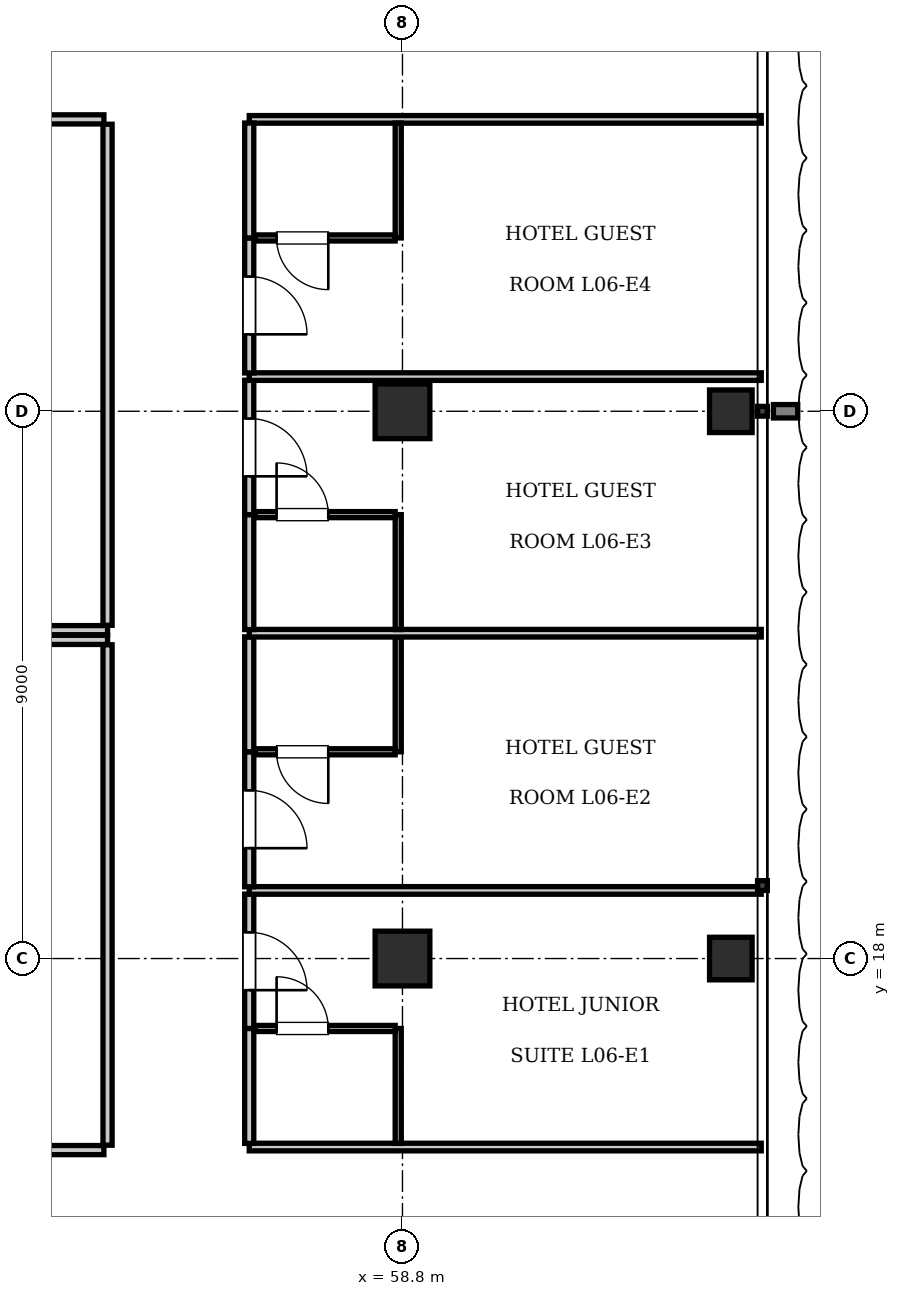
"""IFC4 building model, lengths in metres.
Left out: names, types, materials, properties, quantities, classifications, styles, units other than length and angle.
Written with IfcOpenShell. Run it as: python <this file> out.ifc"""

import sys

from ifc_helpers import new_model, si_unit, direction, frame, frame_2d, origin, origin_2d, place, context, subcontext, project, spatial, rectangle, i_section, extrude, element, fill, save


model = new_model("IFC4")
c1 = context("Model", 3, precision=1e-05, world=origin(), true_north=direction((0.0, 1.0)))
c2 = subcontext(c1, "Body", "Model", "MODEL_VIEW")
j1 = project(units=[si_unit("LENGTHUNIT", "METRE"), si_unit("PLANEANGLEUNIT", "RADIAN")], contexts=[c1])
p1 = place(None, origin())
s1 = spatial("IfcSite", under=j1, at=p1, CompositionType="ELEMENT")
p2 = place(p1, origin())
s2 = spatial("IfcBuilding", under=s1, at=p2, CompositionType="ELEMENT")
p3 = place(p2, frame((0.0, 0.0, 30.8)))
s3 = spatial("IfcBuildingStorey", under=s2, at=p3, CompositionType="ELEMENT", Elevation=30.8)
for number, where, z_axis, x_axis in (
    (1, (58.8, 18.0, 0.0), (0.0, 0.0, 1.0), (1.0, 0.0, 0.0)),
    (2, (58.8, 27.0, 0.0), (0.0, 0.0, 1.0), (1.0, 0.0, 0.0)),
):
    element("IfcColumn", number, at=place(p3, frame(where, z_axis=z_axis, x_axis=x_axis)), inside=s3, PredefinedType="COLUMN", context=c2, shape_type="SweptSolid", body=[
        extrude(rectangle(XDim=0.9, YDim=0.9, at=origin_2d()), origin(), (0.0, 0.0, 1.0), 3.85),
    ])
for number, where, z_axis, x_axis in (
    (3, (64.2, 18.0, 0.0), (0.0, 0.0, 1.0), (1.0, 0.0, 0.0)),
    (4, (64.2, 27.0, 0.0), (0.0, 0.0, 1.0), (1.0, 0.0, 0.0)),
):
    element("IfcColumn", number, at=place(p3, frame(where, z_axis=z_axis, x_axis=x_axis)), inside=s3, PredefinedType="COLUMN", context=c2, shape_type="SweptSolid", body=[
        extrude(i_section(OverallWidth=0.7, OverallDepth=0.7, WebThickness=0.028, FlangeThickness=0.044, at=origin_2d()), origin(), (0.0, 0.0, 1.0), 3.85),
    ])
p4 = place(p3, frame((21.65, 23.4, 0.0), z_axis=(0.0, 0.0, 1.0), x_axis=(1.0, 0.0, 0.0)))
e5 = element("IfcWall", 5, at=p4, inside=s3, PredefinedType="PARTITIONING", context=c2, shape_type="SweptSolid", body=[
    extrude(rectangle(XDim=32.3, YDim=0.15, at=frame_2d((16.15, 0.0))), origin(), (0.0, 0.0, 1.0), 3.61),
])
p5 = place(p3, frame((53.95, 23.48, 0.0), z_axis=(0.0, 0.0, 1.0), x_axis=(0.0, 1.0, 0.0)))
e6 = element("IfcWall", 6, at=p5, inside=s3, PredefinedType="PARTITIONING", context=c2, shape_type="SweptSolid", body=[
    extrude(rectangle(XDim=8.24, YDim=0.15, at=frame_2d((4.12, 0.0))), origin(), (0.0, 0.0, 1.0), 3.61),
])
p6 = place(p3, frame((42.998, 31.8, 0.0), z_axis=(0.0, 0.0, 1.0), x_axis=(1.0, 0.0, 0.0)))
e7 = element("IfcWall", 7, at=p6, inside=s3, PredefinedType="PARTITIONING", context=c2, shape_type="SweptSolid", body=[
    extrude(rectangle(XDim=10.892, YDim=0.15, at=frame_2d((5.446, 0.0))), origin(), (0.0, 0.0, 1.0), 3.61),
])
p7 = place(p6, frame((4.996, 0.0, 0.0)))
e8 = element("IfcOpeningElement", 8, at=p7, cuts=e7, PredefinedType="OPENING", context=c2, shape_type="SweptSolid", body=[
    extrude(rectangle(XDim=0.9, YDim=2.1, at=frame_2d((0.45, 1.05))), frame((0.0, 0.085, 0.0), z_axis=(0.0, -1.0, 0.0), x_axis=(1.0, 0.0, 0.0)), (0.0, 0.0, 1.0), 0.17),
])
p8 = place(p3, frame((21.65, 23.24, 0.0), z_axis=(0.0, 0.0, 1.0), x_axis=(1.0, 0.0, 0.0)))
e9 = element("IfcWall", 9, at=p8, inside=s3, PredefinedType="PARTITIONING", context=c2, shape_type="SweptSolid", body=[
    extrude(rectangle(XDim=32.3, YDim=0.15, at=frame_2d((16.15, 0.0))), origin(), (0.0, 0.0, 1.0), 3.61),
])
p9 = place(p3, frame((53.95, 14.93, 0.0), z_axis=(0.0, 0.0, 1.0), x_axis=(0.0, 1.0, 0.0)))
e10 = element("IfcWall", 10, at=p9, inside=s3, PredefinedType="PARTITIONING", context=c2, shape_type="SweptSolid", body=[
    extrude(rectangle(XDim=8.23, YDim=0.15, at=frame_2d((4.115, 0.0))), origin(), (0.0, 0.0, 1.0), 3.61),
])
p10 = place(p3, frame((33.631, 14.85, 0.0), z_axis=(0.0, 0.0, 1.0), x_axis=(1.0, 0.0, 0.0)))
e11 = element("IfcWall", 11, at=p10, inside=s3, PredefinedType="PARTITIONING", context=c2, shape_type="SweptSolid", body=[
    extrude(rectangle(XDim=20.259, YDim=0.15, at=frame_2d((10.129, 0.0))), origin(), (0.0, 0.0, 1.0), 3.61),
])
p11 = place(p10, frame((9.679, 0.0, 0.0)))
e12 = element("IfcOpeningElement", 12, at=p11, cuts=e11, PredefinedType="OPENING", context=c2, shape_type="SweptSolid", body=[
    extrude(rectangle(XDim=0.9, YDim=2.1, at=frame_2d((0.45, 1.05))), frame((0.0, 0.085, 0.0), z_axis=(0.0, -1.0, 0.0), x_axis=(1.0, 0.0, 0.0)), (0.0, 0.0, 1.0), 0.17),
])
for number, where, z_axis, x_axis in (
    (13, (56.28, 14.9, 0.0), (0.0, 0.0, 1.0), (1.0, 0.0, 0.0)),
    (14, (56.28, 31.8, 0.0), (0.0, 0.0, 1.0), (1.0, 0.0, 0.0)),
):
    element("IfcWall", number, at=place(p3, frame(where, z_axis=z_axis, x_axis=x_axis)), inside=s3, PredefinedType="PARTITIONING", context=c2, shape_type="SweptSolid", body=[
        extrude(rectangle(XDim=8.42, YDim=0.125, at=frame_2d((4.21, 0.0))), origin(), (0.0, 0.0, 1.0), 3.61),
    ])
p12 = place(p3, frame((56.28, 14.96, 0.0), z_axis=(0.0, 0.0, 1.0), x_axis=(0.0, 1.0, 0.0)))
e15 = element("IfcWall", 15, at=p12, inside=s3, PredefinedType="PARTITIONING", context=c2, shape_type="SweptSolid", body=[
    extrude(rectangle(XDim=1.89, YDim=0.15, at=frame_2d((0.945, 0.0))), origin(), (0.0, 0.0, 1.0), 3.61),
])
p13 = place(p3, frame((56.28, 16.85, 0.0), z_axis=(0.0, 0.0, 1.0), x_axis=(0.0, 1.0, 0.0)))
e16 = element("IfcWall", 16, at=p13, inside=s3, PredefinedType="PARTITIONING", context=c2, shape_type="SweptSolid", body=[
    extrude(rectangle(XDim=2.21, YDim=0.15, at=frame_2d((1.105, 0.0))), origin(), (0.0, 0.0, 1.0), 3.61),
])
p14 = place(p13, frame((0.63, 0.0, 0.0)))
e17 = element("IfcOpeningElement", 17, at=p14, cuts=e16, PredefinedType="OPENING", context=c2, shape_type="SweptSolid", body=[
    extrude(rectangle(XDim=0.95, YDim=2.15, at=frame_2d((0.475, 1.075))), frame((0.0, 0.085, 0.0), z_axis=(0.0, -1.0, 0.0), x_axis=(1.0, 0.0, 0.0)), (0.0, 0.0, 1.0), 0.17),
])
p15 = place(p3, frame((58.73, 14.96, 0.0), z_axis=(0.0, 0.0, 1.0), x_axis=(0.0, 1.0, 0.0)))
e18 = element("IfcWall", 18, at=p15, inside=s3, PredefinedType="PARTITIONING", context=c2, shape_type="SweptSolid", body=[
    extrude(rectangle(XDim=1.89, YDim=0.1, at=frame_2d((0.945, 0.0))), origin(), (0.0, 0.0, 1.0), 2.975),
])
p16 = place(p3, frame((56.38, 16.85, 0.0), z_axis=(0.0, 0.0, 1.0), x_axis=(1.0, 0.0, 0.0)))
e19 = element("IfcWall", 19, at=p16, inside=s3, PredefinedType="PARTITIONING", context=c2, shape_type="SweptSolid", body=[
    extrude(rectangle(XDim=2.3, YDim=0.1, at=frame_2d((1.15, 0.0))), origin(), (0.0, 0.0, 1.0), 3.61),
])
p17 = place(p16, frame((0.35, 0.0, 0.0)))
e20 = element("IfcOpeningElement", 20, at=p17, cuts=e19, PredefinedType="OPENING", context=c2, shape_type="SweptSolid", body=[
    extrude(rectangle(XDim=0.85, YDim=2.1, at=frame_2d((0.425, 1.05))), frame((0.0, 0.06, 0.0), z_axis=(0.0, -1.0, 0.0), x_axis=(1.0, 0.0, 0.0)), (0.0, 0.0, 1.0), 0.12),
])
p18 = place(p3, frame((56.28, 19.12, 0.0), z_axis=(0.0, 0.0, 1.0), x_axis=(1.0, 0.0, 0.0)))
e21 = element("IfcWall", 21, at=p18, inside=s3, PredefinedType="PARTITIONING", context=c2, shape_type="SweptSolid", body=[
    extrude(rectangle(XDim=8.42, YDim=0.125, at=frame_2d((4.21, 0.0))), origin(), (0.0, 0.0, 1.0), 3.61),
])
p19 = place(p3, frame((56.28, 19.18, 0.0), z_axis=(0.0, 0.0, 1.0), x_axis=(0.0, 1.0, 0.0)))
e22 = element("IfcWall", 22, at=p19, inside=s3, PredefinedType="PARTITIONING", context=c2, shape_type="SweptSolid", body=[
    extrude(rectangle(XDim=2.22, YDim=0.15, at=frame_2d((1.11, 0.0))), origin(), (0.0, 0.0, 1.0), 3.61),
])
p20 = place(p19, frame((0.635, 0.0, 0.0)))
e23 = element("IfcOpeningElement", 23, at=p20, cuts=e22, PredefinedType="OPENING", context=c2, shape_type="SweptSolid", body=[
    extrude(rectangle(XDim=0.95, YDim=2.15, at=frame_2d((0.475, 1.075))), frame((0.0, 0.085, 0.0), z_axis=(0.0, -1.0, 0.0), x_axis=(1.0, 0.0, 0.0)), (0.0, 0.0, 1.0), 0.17),
])
p21 = place(p3, frame((56.28, 21.4, 0.0), z_axis=(0.0, 0.0, 1.0), x_axis=(0.0, 1.0, 0.0)))
e24 = element("IfcWall", 24, at=p21, inside=s3, PredefinedType="PARTITIONING", context=c2, shape_type="SweptSolid", body=[
    extrude(rectangle(XDim=1.89, YDim=0.15, at=frame_2d((0.945, 0.0))), origin(), (0.0, 0.0, 1.0), 3.61),
])
p22 = place(p3, frame((58.73, 21.4, 0.0), z_axis=(0.0, 0.0, 1.0), x_axis=(0.0, 1.0, 0.0)))
e25 = element("IfcWall", 25, at=p22, inside=s3, PredefinedType="PARTITIONING", context=c2, shape_type="SweptSolid", body=[
    extrude(rectangle(XDim=1.89, YDim=0.1, at=frame_2d((0.945, 0.0))), origin(), (0.0, 0.0, 1.0), 2.975),
])
p23 = place(p3, frame((56.38, 21.4, 0.0), z_axis=(0.0, 0.0, 1.0), x_axis=(1.0, 0.0, 0.0)))
e26 = element("IfcWall", 26, at=p23, inside=s3, PredefinedType="PARTITIONING", context=c2, shape_type="SweptSolid", body=[
    extrude(rectangle(XDim=2.3, YDim=0.1, at=frame_2d((1.15, 0.0))), origin(), (0.0, 0.0, 1.0), 3.61),
])
p24 = place(p23, frame((0.35, 0.0, 0.0)))
e27 = element("IfcOpeningElement", 27, at=p24, cuts=e26, PredefinedType="OPENING", context=c2, shape_type="SweptSolid", body=[
    extrude(rectangle(XDim=0.85, YDim=2.1, at=frame_2d((0.425, 1.05))), frame((0.0, 0.06, 0.0), z_axis=(0.0, -1.0, 0.0), x_axis=(1.0, 0.0, 0.0)), (0.0, 0.0, 1.0), 0.12),
])
p25 = place(p3, frame((56.28, 23.35, 0.0), z_axis=(0.0, 0.0, 1.0), x_axis=(1.0, 0.0, 0.0)))
e28 = element("IfcWall", 28, at=p25, inside=s3, PredefinedType="PARTITIONING", context=c2, shape_type="SweptSolid", body=[
    extrude(rectangle(XDim=8.42, YDim=0.125, at=frame_2d((4.21, 0.0))), origin(), (0.0, 0.0, 1.0), 3.61),
])
p26 = place(p3, frame((56.28, 23.41, 0.0), z_axis=(0.0, 0.0, 1.0), x_axis=(0.0, 1.0, 0.0)))
e29 = element("IfcWall", 29, at=p26, inside=s3, PredefinedType="PARTITIONING", context=c2, shape_type="SweptSolid", body=[
    extrude(rectangle(XDim=1.89, YDim=0.15, at=frame_2d((0.945, 0.0))), origin(), (0.0, 0.0, 1.0), 3.61),
])
p27 = place(p3, frame((56.28, 25.3, 0.0), z_axis=(0.0, 0.0, 1.0), x_axis=(0.0, 1.0, 0.0)))
e30 = element("IfcWall", 30, at=p27, inside=s3, PredefinedType="PARTITIONING", context=c2, shape_type="SweptSolid", body=[
    extrude(rectangle(XDim=2.21, YDim=0.15, at=frame_2d((1.105, 0.0))), origin(), (0.0, 0.0, 1.0), 3.61),
])
p28 = place(p27, frame((0.63, 0.0, 0.0)))
e31 = element("IfcOpeningElement", 31, at=p28, cuts=e30, PredefinedType="OPENING", context=c2, shape_type="SweptSolid", body=[
    extrude(rectangle(XDim=0.95, YDim=2.15, at=frame_2d((0.475, 1.075))), frame((0.0, 0.085, 0.0), z_axis=(0.0, -1.0, 0.0), x_axis=(1.0, 0.0, 0.0)), (0.0, 0.0, 1.0), 0.17),
])
p29 = place(p3, frame((58.73, 23.41, 0.0), z_axis=(0.0, 0.0, 1.0), x_axis=(0.0, 1.0, 0.0)))
e32 = element("IfcWall", 32, at=p29, inside=s3, PredefinedType="PARTITIONING", context=c2, shape_type="SweptSolid", body=[
    extrude(rectangle(XDim=1.89, YDim=0.1, at=frame_2d((0.945, 0.0))), origin(), (0.0, 0.0, 1.0), 2.975),
])
p30 = place(p3, frame((56.38, 25.3, 0.0), z_axis=(0.0, 0.0, 1.0), x_axis=(1.0, 0.0, 0.0)))
e33 = element("IfcWall", 33, at=p30, inside=s3, PredefinedType="PARTITIONING", context=c2, shape_type="SweptSolid", body=[
    extrude(rectangle(XDim=2.3, YDim=0.1, at=frame_2d((1.15, 0.0))), origin(), (0.0, 0.0, 1.0), 3.61),
])
p31 = place(p30, frame((0.35, 0.0, 0.0)))
e34 = element("IfcOpeningElement", 34, at=p31, cuts=e33, PredefinedType="OPENING", context=c2, shape_type="SweptSolid", body=[
    extrude(rectangle(XDim=0.85, YDim=2.1, at=frame_2d((0.425, 1.05))), frame((0.0, 0.06, 0.0), z_axis=(0.0, -1.0, 0.0), x_axis=(1.0, 0.0, 0.0)), (0.0, 0.0, 1.0), 0.12),
])
p32 = place(p3, frame((56.28, 27.57, 0.0), z_axis=(0.0, 0.0, 1.0), x_axis=(1.0, 0.0, 0.0)))
e35 = element("IfcWall", 35, at=p32, inside=s3, PredefinedType="PARTITIONING", context=c2, shape_type="SweptSolid", body=[
    extrude(rectangle(XDim=8.42, YDim=0.125, at=frame_2d((4.21, 0.0))), origin(), (0.0, 0.0, 1.0), 3.61),
])
p33 = place(p3, frame((56.28, 27.63, 0.0), z_axis=(0.0, 0.0, 1.0), x_axis=(0.0, 1.0, 0.0)))
e36 = element("IfcWall", 36, at=p33, inside=s3, PredefinedType="PARTITIONING", context=c2, shape_type="SweptSolid", body=[
    extrude(rectangle(XDim=2.22, YDim=0.15, at=frame_2d((1.11, 0.0))), origin(), (0.0, 0.0, 1.0), 3.61),
])
p34 = place(p33, frame((0.635, 0.0, 0.0)))
e37 = element("IfcOpeningElement", 37, at=p34, cuts=e36, PredefinedType="OPENING", context=c2, shape_type="SweptSolid", body=[
    extrude(rectangle(XDim=0.95, YDim=2.15, at=frame_2d((0.475, 1.075))), frame((0.0, 0.085, 0.0), z_axis=(0.0, -1.0, 0.0), x_axis=(1.0, 0.0, 0.0)), (0.0, 0.0, 1.0), 0.17),
])
p35 = place(p3, frame((56.28, 29.85, 0.0), z_axis=(0.0, 0.0, 1.0), x_axis=(0.0, 1.0, 0.0)))
e38 = element("IfcWall", 38, at=p35, inside=s3, PredefinedType="PARTITIONING", context=c2, shape_type="SweptSolid", body=[
    extrude(rectangle(XDim=1.89, YDim=0.15, at=frame_2d((0.945, 0.0))), origin(), (0.0, 0.0, 1.0), 3.61),
])
p36 = place(p3, frame((58.73, 29.85, 0.0), z_axis=(0.0, 0.0, 1.0), x_axis=(0.0, 1.0, 0.0)))
e39 = element("IfcWall", 39, at=p36, inside=s3, PredefinedType="PARTITIONING", context=c2, shape_type="SweptSolid", body=[
    extrude(rectangle(XDim=1.89, YDim=0.1, at=frame_2d((0.945, 0.0))), origin(), (0.0, 0.0, 1.0), 2.975),
])
p37 = place(p3, frame((56.38, 29.85, 0.0), z_axis=(0.0, 0.0, 1.0), x_axis=(1.0, 0.0, 0.0)))
e40 = element("IfcWall", 40, at=p37, inside=s3, PredefinedType="PARTITIONING", context=c2, shape_type="SweptSolid", body=[
    extrude(rectangle(XDim=2.3, YDim=0.1, at=frame_2d((1.15, 0.0))), origin(), (0.0, 0.0, 1.0), 3.61),
])
p38 = place(p37, frame((0.35, 0.0, 0.0)))
e41 = element("IfcOpeningElement", 41, at=p38, cuts=e40, PredefinedType="OPENING", context=c2, shape_type="SweptSolid", body=[
    extrude(rectangle(XDim=0.85, YDim=2.1, at=frame_2d((0.425, 1.05))), frame((0.0, 0.06, 0.0), z_axis=(0.0, -1.0, 0.0), x_axis=(1.0, 0.0, 0.0)), (0.0, 0.0, 1.0), 0.12),
])
p39 = place(p17, origin())
e42 = element("IfcDoor", 42, at=p39, inside=s3, OperationType="SINGLE_SWING_LEFT", PredefinedType="DOOR", context=c2, shape_type="SweptSolid", body=[
    extrude(rectangle(XDim=0.85, YDim=2.1, at=frame_2d((0.425, 1.05))), frame((0.0, 0.025, 0.0), z_axis=(0.0, -1.0, 0.0), x_axis=(1.0, 0.0, 0.0)), (0.0, 0.0, 1.0), 0.05),
])
fill(e20, e42)
p40 = place(p14, frame((0.95, 0.0, 0.0), z_axis=(0.0, 0.0, 1.0), x_axis=(-1.0, 0.0, 0.0)))
e43 = element("IfcDoor", 43, at=p40, inside=s3, OperationType="SINGLE_SWING_RIGHT", PredefinedType="DOOR", context=c2, shape_type="SweptSolid", body=[
    extrude(rectangle(XDim=0.95, YDim=2.15, at=frame_2d((0.475, 1.075))), frame((0.0, 0.025, 0.0), z_axis=(0.0, -1.0, 0.0), x_axis=(1.0, 0.0, 0.0)), (0.0, 0.0, 1.0), 0.05),
])
fill(e17, e43)
p41 = place(p24, frame((0.85, 0.0, 0.0), z_axis=(0.0, 0.0, 1.0), x_axis=(-1.0, 0.0, 0.0)))
e44 = element("IfcDoor", 44, at=p41, inside=s3, OperationType="SINGLE_SWING_LEFT", PredefinedType="DOOR", context=c2, shape_type="SweptSolid", body=[
    extrude(rectangle(XDim=0.85, YDim=2.1, at=frame_2d((0.425, 1.05))), frame((0.0, 0.025, 0.0), z_axis=(0.0, -1.0, 0.0), x_axis=(1.0, 0.0, 0.0)), (0.0, 0.0, 1.0), 0.05),
])
fill(e27, e44)
p42 = place(p20, frame((0.95, 0.0, 0.0), z_axis=(0.0, 0.0, 1.0), x_axis=(-1.0, 0.0, 0.0)))
e45 = element("IfcDoor", 45, at=p42, inside=s3, OperationType="SINGLE_SWING_RIGHT", PredefinedType="DOOR", context=c2, shape_type="SweptSolid", body=[
    extrude(rectangle(XDim=0.95, YDim=2.15, at=frame_2d((0.475, 1.075))), frame((0.0, 0.025, 0.0), z_axis=(0.0, -1.0, 0.0), x_axis=(1.0, 0.0, 0.0)), (0.0, 0.0, 1.0), 0.05),
])
fill(e23, e45)
p43 = place(p31, origin())
e46 = element("IfcDoor", 46, at=p43, inside=s3, OperationType="SINGLE_SWING_LEFT", PredefinedType="DOOR", context=c2, shape_type="SweptSolid", body=[
    extrude(rectangle(XDim=0.85, YDim=2.1, at=frame_2d((0.425, 1.05))), frame((0.0, 0.025, 0.0), z_axis=(0.0, -1.0, 0.0), x_axis=(1.0, 0.0, 0.0)), (0.0, 0.0, 1.0), 0.05),
])
fill(e34, e46)
p44 = place(p28, frame((0.95, 0.0, 0.0), z_axis=(0.0, 0.0, 1.0), x_axis=(-1.0, 0.0, 0.0)))
e47 = element("IfcDoor", 47, at=p44, inside=s3, OperationType="SINGLE_SWING_RIGHT", PredefinedType="DOOR", context=c2, shape_type="SweptSolid", body=[
    extrude(rectangle(XDim=0.95, YDim=2.15, at=frame_2d((0.475, 1.075))), frame((0.0, 0.025, 0.0), z_axis=(0.0, -1.0, 0.0), x_axis=(1.0, 0.0, 0.0)), (0.0, 0.0, 1.0), 0.05),
])
fill(e31, e47)
p45 = place(p38, frame((0.85, 0.0, 0.0), z_axis=(0.0, 0.0, 1.0), x_axis=(-1.0, 0.0, 0.0)))
e48 = element("IfcDoor", 48, at=p45, inside=s3, OperationType="SINGLE_SWING_LEFT", PredefinedType="DOOR", context=c2, shape_type="SweptSolid", body=[
    extrude(rectangle(XDim=0.85, YDim=2.1, at=frame_2d((0.425, 1.05))), frame((0.0, 0.025, 0.0), z_axis=(0.0, -1.0, 0.0), x_axis=(1.0, 0.0, 0.0)), (0.0, 0.0, 1.0), 0.05),
])
fill(e41, e48)
p46 = place(p34, frame((0.95, 0.0, 0.0), z_axis=(0.0, 0.0, 1.0), x_axis=(-1.0, 0.0, 0.0)))
e49 = element("IfcDoor", 49, at=p46, inside=s3, OperationType="SINGLE_SWING_RIGHT", PredefinedType="DOOR", context=c2, shape_type="SweptSolid", body=[
    extrude(rectangle(XDim=0.95, YDim=2.15, at=frame_2d((0.475, 1.075))), frame((0.0, 0.025, 0.0), z_axis=(0.0, -1.0, 0.0), x_axis=(1.0, 0.0, 0.0)), (0.0, 0.0, 1.0), 0.05),
])
fill(e37, e49)
save(model, sys.argv[1])
